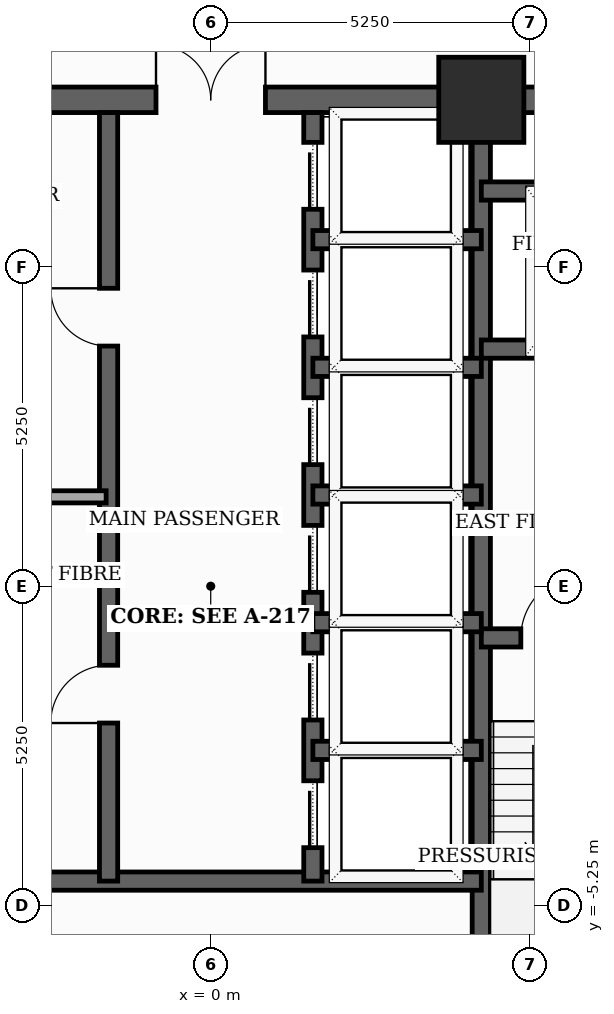
"""IFC4 building model, lengths in metres.
Left out: names, types, materials, properties, quantities, classifications, styles, units other than length and angle.
Written with IfcOpenShell. Run it as: python <this file> out.ifc"""

import sys

from ifc_helpers import new_model, si_unit, direction, frame, frame_2d, origin, origin_2d, place, context, subcontext, project, spatial, rectangle, extrude, element, fill, save


model = new_model("IFC4")
c1 = context("Model", 3, precision=1e-05, world=origin(), true_north=direction((0.0, 1.0)))
c2 = subcontext(c1, "Body", "Model", "MODEL_VIEW")
j1 = project(units=[si_unit("LENGTHUNIT", "METRE"), si_unit("PLANEANGLEUNIT", "RADIAN")], contexts=[c1])
p1 = place(None, origin())
s1 = spatial("IfcSite", under=j1, at=p1, CompositionType="ELEMENT")
p2 = place(p1, origin())
s2 = spatial("IfcBuilding", under=s1, at=p2, CompositionType="ELEMENT")
p3 = place(p2, frame((0.0, 0.0, 123.6)))
s3 = spatial("IfcBuildingStorey", under=s2, at=p3, CompositionType="ELEMENT", Elevation=123.6)
p4 = place(p3, frame((4.45, 8.0, 0.0), z_axis=(0.0, 0.0, 1.0), x_axis=(1.0, 0.0, 0.0)))
e1 = element("IfcColumn", 1, at=p4, inside=s3, PredefinedType="COLUMN", context=c2, shape_type="SweptSolid", body=[
    extrude(rectangle(XDim=1.4, YDim=1.4, at=origin_2d()), origin(), (0.0, 0.0, 1.0), 3.7),
])
p5 = place(p3, frame((-8.0, 8.0, 0.0), z_axis=(0.0, 0.0, 1.0), x_axis=(1.0, 0.0, 0.0)))
e2 = element("IfcWall", 2, at=p5, inside=s3, PredefinedType="SHEAR", context=c2, shape_type="SweptSolid", body=[
    extrude(rectangle(XDim=16.0, YDim=0.42, at=frame_2d((8.0, 0.0))), origin(), (0.0, 0.0, 1.0), 3.5),
])
p6 = place(p5, frame((7.1, 0.0, 0.0)))
e3 = element("IfcOpeningElement", 3, at=p6, cuts=e2, PredefinedType="OPENING", context=c2, shape_type="SweptSolid", body=[
    extrude(rectangle(XDim=1.8, YDim=2.15, at=frame_2d((0.9, 1.075))), frame((0.0, 0.22, 0.0), z_axis=(0.0, -1.0, 0.0), x_axis=(1.0, 0.0, 0.0)), (0.0, 0.0, 1.0), 0.44),
])
p7 = place(p3, frame((4.45, -7.79, 0.0), z_axis=(0.0, 0.0, 1.0), x_axis=(0.0, 1.0, 0.0)))
e4 = element("IfcWall", 4, at=p7, inside=s3, PredefinedType="SHEAR", context=c2, shape_type="SweptSolid", body=[
    extrude(rectangle(XDim=15.58, YDim=0.3, at=frame_2d((7.79, 0.0))), origin(), (0.0, 0.0, 1.0), 3.5),
])
p8 = place(p3, frame((4.45, -0.85, 0.0), z_axis=(0.0, 0.0, 1.0), x_axis=(1.0, 0.0, 0.0)))
e5 = element("IfcWall", 5, at=p8, inside=s3, PredefinedType="SHEAR", context=c2, shape_type="SweptSolid", body=[
    extrude(rectangle(XDim=3.34, YDim=0.3, at=frame_2d((1.67, 0.0))), origin(), (0.0, 0.0, 1.0), 3.5),
])
p9 = place(p8, frame((0.65, 0.0, 0.0)))
e6 = element("IfcOpeningElement", 6, at=p9, cuts=e5, PredefinedType="OPENING", context=c2, shape_type="SweptSolid", body=[
    extrude(rectangle(XDim=1.05, YDim=2.15, at=frame_2d((0.525, 1.075))), frame((0.0, 0.16, 0.0), z_axis=(0.0, -1.0, 0.0), x_axis=(1.0, 0.0, 0.0)), (0.0, 0.0, 1.0), 0.32),
])
p10 = place(p3, frame((4.45, 3.9, 0.0), z_axis=(0.0, 0.0, 1.0), x_axis=(1.0, 0.0, 0.0)))
e7 = element("IfcWall", 7, at=p10, inside=s3, PredefinedType="SHEAR", context=c2, shape_type="SweptSolid", body=[
    extrude(rectangle(XDim=3.34, YDim=0.3, at=frame_2d((1.67, 0.0))), origin(), (0.0, 0.0, 1.0), 3.5),
])
p11 = place(p10, frame((1.18, 0.0, 0.0)))
e8 = element("IfcOpeningElement", 8, at=p11, cuts=e7, PredefinedType="OPENING", context=c2, shape_type="SweptSolid", body=[
    extrude(rectangle(XDim=1.1, YDim=2.1, at=frame_2d((0.55, 1.05))), frame((0.0, 0.16, 0.0), z_axis=(0.0, -1.0, 0.0), x_axis=(1.0, 0.0, 0.0)), (0.0, 0.0, 1.0), 0.32),
])
p12 = place(p3, frame((4.45, 6.5, 0.0), z_axis=(0.0, 0.0, 1.0), x_axis=(1.0, 0.0, 0.0)))
e9 = element("IfcWall", 9, at=p12, inside=s3, PredefinedType="SHEAR", context=c2, shape_type="SweptSolid", body=[
    extrude(rectangle(XDim=3.34, YDim=0.3, at=frame_2d((1.67, 0.0))), origin(), (0.0, 0.0, 1.0), 3.5),
])
p13 = place(p3, frame((-4.45, -4.85, 0.0), z_axis=(0.0, 0.0, 1.0), x_axis=(1.0, 0.0, 0.0)))
e10 = element("IfcWall", 10, at=p13, inside=s3, PredefinedType="SHEAR", context=c2, shape_type="SweptSolid", body=[
    extrude(rectangle(XDim=8.9, YDim=0.3, at=frame_2d((4.45, 0.0))), origin(), (0.0, 0.0, 1.0), 3.5),
])
p14 = place(p3, frame((-1.68, -4.85, 0.0), z_axis=(0.0, 0.0, 1.0), x_axis=(0.0, 1.0, 0.0)))
e11 = element("IfcWall", 11, at=p14, inside=s3, PredefinedType="SHEAR", context=c2, shape_type="SweptSolid", body=[
    extrude(rectangle(XDim=12.64, YDim=0.3, at=frame_2d((6.32, 0.0))), origin(), (0.0, 0.0, 1.0), 3.5),
])
p15 = place(p14, frame((2.6, 0.0, 0.0)))
e12 = element("IfcOpeningElement", 12, at=p15, cuts=e11, PredefinedType="OPENING", context=c2, shape_type="SweptSolid", body=[
    extrude(rectangle(XDim=0.95, YDim=2.1, at=frame_2d((0.475, 1.05))), frame((0.0, 0.16, 0.0), z_axis=(0.0, -1.0, 0.0), x_axis=(1.0, 0.0, 0.0)), (0.0, 0.0, 1.0), 0.32),
])
p16 = place(p14, frame((8.8, 0.0, 0.0)))
e13 = element("IfcOpeningElement", 13, at=p16, cuts=e11, PredefinedType="OPENING", context=c2, shape_type="SweptSolid", body=[
    extrude(rectangle(XDim=0.95, YDim=2.1, at=frame_2d((0.475, 1.05))), frame((0.0, 0.16, 0.0), z_axis=(0.0, -1.0, 0.0), x_axis=(1.0, 0.0, 0.0)), (0.0, 0.0, 1.0), 0.32),
])
p17 = place(p3, frame((1.68, -4.85, 0.0), z_axis=(0.0, 0.0, 1.0), x_axis=(0.0, 1.0, 0.0)))
e14 = element("IfcWall", 14, at=p17, inside=s3, PredefinedType="SHEAR", context=c2, shape_type="SweptSolid", body=[
    extrude(rectangle(XDim=12.64, YDim=0.3, at=frame_2d((6.32, 0.0))), origin(), (0.0, 0.0, 1.0), 3.5),
])
p18 = place(p17, frame((0.55, 0.0, 0.0)))
e15 = element("IfcOpeningElement", 15, at=p18, cuts=e14, PredefinedType="OPENING", context=c2, shape_type="SweptSolid", body=[
    extrude(rectangle(XDim=1.1, YDim=2.1, at=frame_2d((0.55, 1.05))), frame((0.0, 0.16, 0.0), z_axis=(0.0, -1.0, 0.0), x_axis=(1.0, 0.0, 0.0)), (0.0, 0.0, 1.0), 0.32),
])
p19 = place(p17, frame((2.65, 0.0, 0.0)))
e16 = element("IfcOpeningElement", 16, at=p19, cuts=e14, PredefinedType="OPENING", context=c2, shape_type="SweptSolid", body=[
    extrude(rectangle(XDim=1.1, YDim=2.1, at=frame_2d((0.55, 1.05))), frame((0.0, 0.16, 0.0), z_axis=(0.0, -1.0, 0.0), x_axis=(1.0, 0.0, 0.0)), (0.0, 0.0, 1.0), 0.32),
])
p20 = place(p17, frame((4.75, 0.0, 0.0)))
e17 = element("IfcOpeningElement", 17, at=p20, cuts=e14, PredefinedType="OPENING", context=c2, shape_type="SweptSolid", body=[
    extrude(rectangle(XDim=1.1, YDim=2.1, at=frame_2d((0.55, 1.05))), frame((0.0, 0.16, 0.0), z_axis=(0.0, -1.0, 0.0), x_axis=(1.0, 0.0, 0.0)), (0.0, 0.0, 1.0), 0.32),
])
p21 = place(p17, frame((6.85, 0.0, 0.0)))
e18 = element("IfcOpeningElement", 18, at=p21, cuts=e14, PredefinedType="OPENING", context=c2, shape_type="SweptSolid", body=[
    extrude(rectangle(XDim=1.1, YDim=2.1, at=frame_2d((0.55, 1.05))), frame((0.0, 0.16, 0.0), z_axis=(0.0, -1.0, 0.0), x_axis=(1.0, 0.0, 0.0)), (0.0, 0.0, 1.0), 0.32),
])
p22 = place(p17, frame((8.95, 0.0, 0.0)))
e19 = element("IfcOpeningElement", 19, at=p22, cuts=e14, PredefinedType="OPENING", context=c2, shape_type="SweptSolid", body=[
    extrude(rectangle(XDim=1.1, YDim=2.1, at=frame_2d((0.55, 1.05))), frame((0.0, 0.16, 0.0), z_axis=(0.0, -1.0, 0.0), x_axis=(1.0, 0.0, 0.0)), (0.0, 0.0, 1.0), 0.32),
])
p23 = place(p17, frame((11.05, 0.0, 0.0)))
e20 = element("IfcOpeningElement", 20, at=p23, cuts=e14, PredefinedType="OPENING", context=c2, shape_type="SweptSolid", body=[
    extrude(rectangle(XDim=1.1, YDim=2.1, at=frame_2d((0.55, 1.05))), frame((0.0, 0.16, 0.0), z_axis=(0.0, -1.0, 0.0), x_axis=(1.0, 0.0, 0.0)), (0.0, 0.0, 1.0), 0.32),
])
for number, where, z_axis, x_axis in (
    (21, (1.68, 1.5, 0.0), (0.0, 0.0, 1.0), (1.0, 0.0, 0.0)),
    (22, (1.68, 3.6, 0.0), (0.0, 0.0, 1.0), (1.0, 0.0, 0.0)),
    (23, (1.68, 5.7, 0.0), (0.0, 0.0, 1.0), (1.0, 0.0, 0.0)),
    (24, (1.68, -2.7, 0.0), (0.0, 0.0, 1.0), (1.0, 0.0, 0.0)),
    (25, (1.68, -0.6, 0.0), (0.0, 0.0, 1.0), (1.0, 0.0, 0.0)),
):
    element("IfcWall", number, at=place(p3, frame(where, z_axis=z_axis, x_axis=x_axis)), inside=s3, PredefinedType="SHEAR", context=c2, shape_type="SweptSolid", body=[
        extrude(rectangle(XDim=2.77, YDim=0.3, at=frame_2d((1.385, 0.0))), origin(), (0.0, 0.0, 1.0), 3.5),
    ])
p24 = place(p3, frame((-4.4, 1.47, 0.0), z_axis=(0.0, 0.0, 1.0), x_axis=(1.0, 0.0, 0.0)))
e26 = element("IfcWall", 26, at=p24, inside=s3, PredefinedType="SOLIDWALL", context=c2, shape_type="SweptSolid", body=[
    extrude(rectangle(XDim=2.68, YDim=0.2, at=frame_2d((1.34, 0.0))), origin(), (0.0, 0.0, 1.0), 3.5),
])
p25 = place(p6, origin())
e27 = element("IfcDoor", 27, at=p25, inside=s3, OperationType="DOUBLE_DOOR_SINGLE_SWING", PredefinedType="DOOR", context=c2, shape_type="SweptSolid", body=[
    extrude(rectangle(XDim=1.8, YDim=2.15, at=frame_2d((0.9, 1.075))), frame((0.0, 0.025, 0.0), z_axis=(0.0, -1.0, 0.0), x_axis=(1.0, 0.0, 0.0)), (0.0, 0.0, 1.0), 0.05),
])
fill(e3, e27)
p26 = place(p9, origin())
e28 = element("IfcDoor", 28, at=p26, inside=s3, OperationType="SINGLE_SWING_RIGHT", PredefinedType="DOOR", context=c2, shape_type="SweptSolid", body=[
    extrude(rectangle(XDim=1.05, YDim=2.15, at=frame_2d((0.525, 1.075))), frame((0.0, 0.025, 0.0), z_axis=(0.0, -1.0, 0.0), x_axis=(1.0, 0.0, 0.0)), (0.0, 0.0, 1.0), 0.05),
])
fill(e6, e28)
p27 = place(p15, origin())
e29 = element("IfcDoor", 29, at=p27, inside=s3, OperationType="SINGLE_SWING_LEFT", PredefinedType="DOOR", context=c2, shape_type="SweptSolid", body=[
    extrude(rectangle(XDim=0.95, YDim=2.1, at=frame_2d((0.475, 1.05))), frame((0.0, 0.025, 0.0), z_axis=(0.0, -1.0, 0.0), x_axis=(1.0, 0.0, 0.0)), (0.0, 0.0, 1.0), 0.05),
])
fill(e12, e29)
p28 = place(p16, origin())
e30 = element("IfcDoor", 30, at=p28, inside=s3, OperationType="SINGLE_SWING_RIGHT", PredefinedType="DOOR", context=c2, shape_type="SweptSolid", body=[
    extrude(rectangle(XDim=0.95, YDim=2.1, at=frame_2d((0.475, 1.05))), frame((0.0, 0.025, 0.0), z_axis=(0.0, -1.0, 0.0), x_axis=(1.0, 0.0, 0.0)), (0.0, 0.0, 1.0), 0.05),
])
fill(e13, e30)
p29 = place(p18, origin())
e31 = element("IfcDoor", 31, at=p29, inside=s3, OperationType="SLIDING_TO_LEFT", PredefinedType="DOOR", context=c2, shape_type="SweptSolid", body=[
    extrude(rectangle(XDim=1.1, YDim=2.1, at=frame_2d((0.55, 1.05))), frame((0.0, 0.025, 0.0), z_axis=(0.0, -1.0, 0.0), x_axis=(1.0, 0.0, 0.0)), (0.0, 0.0, 1.0), 0.05),
])
fill(e15, e31)
p30 = place(p19, origin())
e32 = element("IfcDoor", 32, at=p30, inside=s3, OperationType="SLIDING_TO_LEFT", PredefinedType="DOOR", context=c2, shape_type="SweptSolid", body=[
    extrude(rectangle(XDim=1.1, YDim=2.1, at=frame_2d((0.55, 1.05))), frame((0.0, 0.025, 0.0), z_axis=(0.0, -1.0, 0.0), x_axis=(1.0, 0.0, 0.0)), (0.0, 0.0, 1.0), 0.05),
])
fill(e16, e32)
p31 = place(p20, origin())
e33 = element("IfcDoor", 33, at=p31, inside=s3, OperationType="SLIDING_TO_LEFT", PredefinedType="DOOR", context=c2, shape_type="SweptSolid", body=[
    extrude(rectangle(XDim=1.1, YDim=2.1, at=frame_2d((0.55, 1.05))), frame((0.0, 0.025, 0.0), z_axis=(0.0, -1.0, 0.0), x_axis=(1.0, 0.0, 0.0)), (0.0, 0.0, 1.0), 0.05),
])
fill(e17, e33)
p32 = place(p21, origin())
e34 = element("IfcDoor", 34, at=p32, inside=s3, OperationType="SLIDING_TO_LEFT", PredefinedType="DOOR", context=c2, shape_type="SweptSolid", body=[
    extrude(rectangle(XDim=1.1, YDim=2.1, at=frame_2d((0.55, 1.05))), frame((0.0, 0.025, 0.0), z_axis=(0.0, -1.0, 0.0), x_axis=(1.0, 0.0, 0.0)), (0.0, 0.0, 1.0), 0.05),
])
fill(e18, e34)
p33 = place(p22, origin())
e35 = element("IfcDoor", 35, at=p33, inside=s3, OperationType="SLIDING_TO_LEFT", PredefinedType="DOOR", context=c2, shape_type="SweptSolid", body=[
    extrude(rectangle(XDim=1.1, YDim=2.1, at=frame_2d((0.55, 1.05))), frame((0.0, 0.025, 0.0), z_axis=(0.0, -1.0, 0.0), x_axis=(1.0, 0.0, 0.0)), (0.0, 0.0, 1.0), 0.05),
])
fill(e19, e35)
p34 = place(p23, origin())
e36 = element("IfcDoor", 36, at=p34, inside=s3, OperationType="SLIDING_TO_LEFT", PredefinedType="DOOR", context=c2, shape_type="SweptSolid", body=[
    extrude(rectangle(XDim=1.1, YDim=2.1, at=frame_2d((0.55, 1.05))), frame((0.0, 0.025, 0.0), z_axis=(0.0, -1.0, 0.0), x_axis=(1.0, 0.0, 0.0)), (0.0, 0.0, 1.0), 0.05),
])
fill(e20, e36)
save(model, sys.argv[1])
